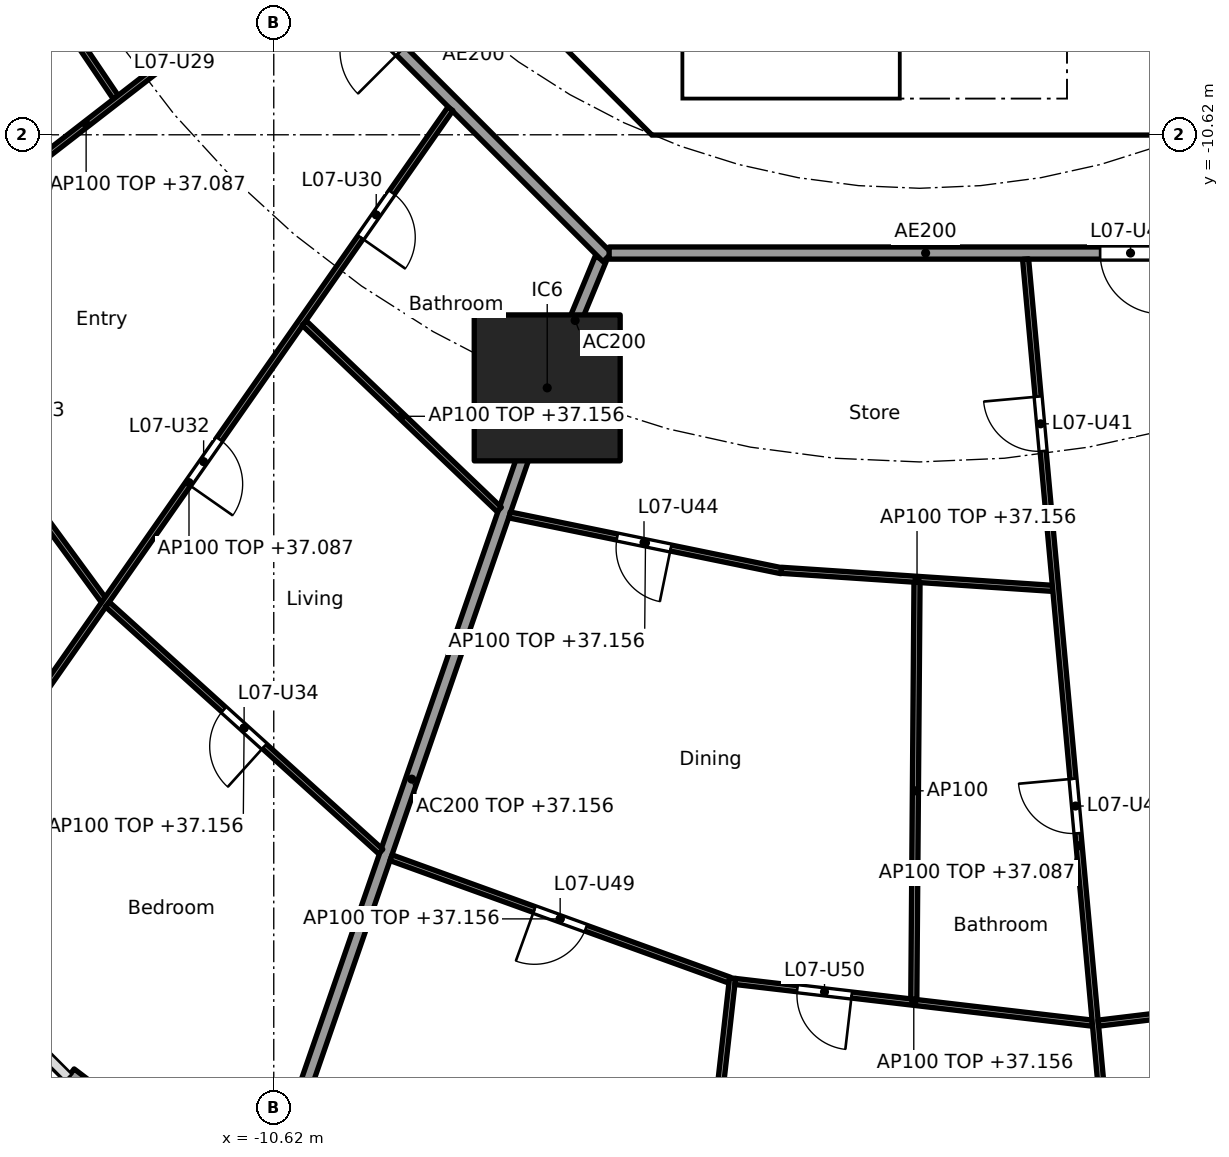
"""IFC4 building model, lengths in metres.
Left out: names, types, materials, properties, quantities, classifications, styles, units other than length and angle.
Written with IfcOpenShell. Run it as: python <this file> out.ifc"""

import sys

from ifc_helpers import new_model, si_unit, direction, frame, frame_2d, origin, origin_2d, place, context, subcontext, project, spatial, polyline, rectangle, outline, extrude, element, fill, save


model = new_model("IFC4")
c1 = context("Model", 3, precision=1e-05, world=origin(), true_north=direction((0.0, 1.0)))
c2 = subcontext(c1, "Body", "Model", "MODEL_VIEW")
j1 = project(units=[si_unit("LENGTHUNIT", "METRE"), si_unit("PLANEANGLEUNIT", "RADIAN")], contexts=[c1])
p1 = place(None, origin())
s1 = spatial("IfcSite", under=j1, at=p1, CompositionType="ELEMENT")
p2 = place(p1, origin())
s2 = spatial("IfcBuilding", under=s1, at=p2, CompositionType="ELEMENT")
p3 = place(p2, frame((0.0, 0.0, 34.4)))
s3 = spatial("IfcBuildingStorey", under=s2, at=p3, CompositionType="ELEMENT", Elevation=34.4)
p4 = place(p3, frame((-6.123, -14.782, 0.0), z_axis=(0.0, 0.0, 1.0), x_axis=(1.0, 0.0, 0.0)))
e1 = element("IfcColumn", 1, at=p4, inside=s3, PredefinedType="COLUMN", context=c2, shape_type="SweptSolid", body=[
    extrude(rectangle(XDim=2.4, YDim=2.4, at=origin_2d()), origin(), (0.0, 0.0, 1.0), 3.7),
])
p5 = place(p3, frame((-11.382, -28.056, 0.0), z_axis=(0.0, 0.0, 1.0), x_axis=(-0.796022293214, 0.605267303517, 0.0)))
e2 = element("IfcWall", 2, at=p5, inside=s3, PredefinedType="SOLIDWALL", context=c2, shape_type="SweptSolid", body=[
    extrude(rectangle(XDim=3.262, YDim=0.25, at=frame_2d((1.631, 0.0))), origin(), (0.0, 0.0, 1.0), 3.44),
])
p6 = place(p5, frame((0.581, 0.0, 0.0)))
e3 = element("IfcOpeningElement", 3, at=p6, cuts=e2, PredefinedType="OPENING", context=c2, shape_type="SweptSolid", body=[
    extrude(rectangle(XDim=2.1, YDim=2.4, at=frame_2d((1.05, 1.2))), frame((0.0, 0.135, 0.0), z_axis=(0.0, -1.0, 0.0), x_axis=(1.0, 0.0, 0.0)), (0.0, 0.0, 1.0), 0.27),
])
p7 = place(p3, frame((-9.988, -4.613, 0.0), z_axis=(0.0, 0.0, 1.0), x_axis=(0.707106781187, -0.707106781187, 0.0)))
e4 = element("IfcWall", 4, at=p7, inside=s3, PredefinedType="SHEAR", context=c2, shape_type="SweptSolid", body=[
    extrude(rectangle(XDim=7.602, YDim=0.6, at=frame_2d((3.801, 0.0))), origin(), (0.0, 0.0, 1.0), 3.44),
])
p8 = place(p7, frame((6.151, 0.0, 0.0)))
e5 = element("IfcOpeningElement", 5, at=p8, cuts=e4, PredefinedType="OPENING", context=c2, shape_type="SweptSolid", body=[
    extrude(rectangle(XDim=1.1, YDim=2.1, at=frame_2d((0.55, 1.05))), frame((0.0, 0.31, 0.0), z_axis=(0.0, -1.0, 0.0), x_axis=(1.0, 0.0, 0.0)), (0.0, 0.0, 1.0), 0.62),
])
p9 = place(p3, origin())
e6 = element("IfcWall", 6, at=p9, inside=s3, PredefinedType="SHEAR", context=c2, shape_type="SweptSolid", body=[
    extrude(outline(polyline([(-4.152, -10.025), (4.152, -10.025), (4.401, -9.776), (4.825, -10.2), (4.401, -10.625), (-4.401, -10.625), (-4.825, -10.2), (-4.401, -9.776), (-4.152, -10.025)])), origin(), (0.0, 0.0, 1.0), 3.44),
])
p10 = place(p3, origin())
e7 = element("IfcWall", 7, at=p10, inside=s3, PredefinedType="SOLIDWALL", context=c2, shape_type="SweptSolid", body=[
    extrude(outline(polyline([(-3.9, -10.025), (-4.1, -10.025), (-4.1, -7.025), (-3.9, -7.025), (-3.9, -10.025)])), origin(), (0.0, 0.0, 1.0), 3.44),
])
p11 = place(p3, frame((-5.243, -12.657, 0.0), z_axis=(0.0, 0.0, 1.0), x_axis=(-0.382668627144, -0.923885664896, 0.0)))
e8 = element("IfcWall", 8, at=p11, inside=s3, PredefinedType="PARTITIONING", context=c2, shape_type="SweptSolid", body=[
    extrude(rectangle(XDim=2.2, YDim=0.2, at=frame_2d((1.1, 0.0))), origin(), (0.0, 0.0, 1.0), 3.44),
])
p12 = place(p3, frame((-6.139, -14.829, 0.0), z_axis=(0.0, 0.0, 1.0), x_axis=(-0.327178799566, -0.944962450637, 0.0)))
e9 = element("IfcWall", 9, at=p12, inside=s3, PredefinedType="PARTITIONING", context=c2, shape_type="SweptSolid", body=[
    extrude(rectangle(XDim=13.517, YDim=0.2, at=frame_2d((6.759, 0.0))), origin(), (0.0, 0.0, 1.0), 2.756),
])
p13 = place(p3, frame((-12.635, -5.134, 0.0), z_axis=(0.0, 0.0, 1.0), x_axis=(0.707106781187, -0.707106781187, 0.0)))
e10 = element("IfcWall", 10, at=p13, inside=s3, PredefinedType="PARTITIONING", context=c2, shape_type="SweptSolid", body=[
    extrude(rectangle(XDim=10.609, YDim=0.2, at=frame_2d((5.305, 0.0))), origin(), (0.0, 0.0, 1.0), 3.44),
])
p14 = place(p13, frame((4.804, 0.0, 0.0)))
e11 = element("IfcOpeningElement", 11, at=p14, cuts=e10, PredefinedType="OPENING", context=c2, shape_type="SweptSolid", body=[
    extrude(rectangle(XDim=1.0, YDim=2.1, at=frame_2d((0.5, 1.05))), frame((0.0, 0.11, 0.0), z_axis=(0.0, -1.0, 0.0), x_axis=(1.0, 0.0, 0.0)), (0.0, 0.0, 1.0), 0.22),
])
p15 = place(p3, frame((-5.104, -12.565, 0.0), z_axis=(0.0, 0.0, 1.0), x_axis=(1.0, 0.0, 0.0)))
e12 = element("IfcWall", 12, at=p15, inside=s3, PredefinedType="PARTITIONING", context=c2, shape_type="SweptSolid", body=[
    extrude(rectangle(XDim=10.409, YDim=0.2, at=frame_2d((5.205, 0.0))), origin(), (0.0, 0.0, 1.0), 3.44),
])
p16 = place(p15, frame((8.074, 0.0, 0.0)))
e13 = element("IfcOpeningElement", 13, at=p16, cuts=e12, PredefinedType="OPENING", context=c2, shape_type="SweptSolid", body=[
    extrude(rectangle(XDim=1.0, YDim=2.1, at=frame_2d((0.5, 1.05))), frame((0.0, 0.11, 0.0), z_axis=(0.0, -1.0, 0.0), x_axis=(1.0, 0.0, 0.0)), (0.0, 0.0, 1.0), 0.22),
])
p17 = place(p3, frame((-15.655, -6.391, 0.0), z_axis=(0.0, 0.0, 1.0), x_axis=(0.559126445155, -0.82908239538, 0.0)))
e14 = element("IfcWall", 14, at=p17, inside=s3, PredefinedType="PARTITIONING", context=c2, shape_type="SweptSolid", body=[
    extrude(rectangle(XDim=4.358, YDim=0.1, at=frame_2d((2.179, 0.0))), origin(), (0.0, 0.0, 1.0), 3.44),
])
p18 = place(p3, frame((-10.19, -7.719, 0.0), z_axis=(0.0, 0.0, 1.0), x_axis=(-0.790264549439, -0.612765813259, 0.0)))
e15 = element("IfcWall", 15, at=p18, inside=s3, PredefinedType="PARTITIONING", context=c2, shape_type="SweptSolid", body=[
    extrude(rectangle(XDim=8.896, YDim=0.1, at=frame_2d((4.448, 0.0))), origin(), (0.0, 0.0, 1.0), 2.687),
])
p19 = place(p18, frame((1.448, 0.0, 0.0)))
e16 = element("IfcOpeningElement", 16, at=p19, cuts=e15, PredefinedType="OPENING", context=c2, shape_type="SweptSolid", body=[
    extrude(rectangle(XDim=0.9, YDim=2.1, at=frame_2d((0.45, 1.05))), frame((0.0, 0.06, 0.0), z_axis=(0.0, -1.0, 0.0), x_axis=(1.0, 0.0, 0.0)), (0.0, 0.0, 1.0), 0.12),
])
p20 = place(p18, frame((5.871, 0.0, 0.0)))
e17 = element("IfcOpeningElement", 17, at=p20, cuts=e15, PredefinedType="OPENING", context=c2, shape_type="SweptSolid", body=[
    extrude(rectangle(XDim=0.9, YDim=2.1, at=frame_2d((0.45, 1.05))), frame((0.0, 0.06, 0.0), z_axis=(0.0, -1.0, 0.0), x_axis=(1.0, 0.0, 0.0)), (0.0, 0.0, 1.0), 0.12),
])
p21 = place(p3, frame((-17.152, -13.18, 0.0), z_axis=(0.0, 0.0, 1.0), x_axis=(0.591222750954, -0.806508312886, 0.0)))
e18 = element("IfcWall", 18, at=p21, inside=s3, PredefinedType="PARTITIONING", context=c2, shape_type="SweptSolid", body=[
    extrude(rectangle(XDim=6.31, YDim=0.1, at=frame_2d((3.155, 0.0))), origin(), (0.0, 0.0, 1.0), 2.756),
])
p22 = place(p21, frame((2.705, 0.0, 0.0)))
e19 = element("IfcOpeningElement", 19, at=p22, cuts=e18, PredefinedType="OPENING", context=c2, shape_type="SweptSolid", body=[
    extrude(rectangle(XDim=0.9, YDim=2.1, at=frame_2d((0.45, 1.05))), frame((0.0, 0.06, 0.0), z_axis=(0.0, -1.0, 0.0), x_axis=(1.0, 0.0, 0.0)), (0.0, 0.0, 1.0), 0.12),
])
p23 = place(p3, frame((-7.715, -10.193, 0.0), z_axis=(0.0, 0.0, 1.0), x_axis=(-0.573126964124, -0.819466584428, 0.0)))
e20 = element("IfcWall", 20, at=p23, inside=s3, PredefinedType="PARTITIONING", context=c2, shape_type="SweptSolid", body=[
    extrude(rectangle(XDim=15.001, YDim=0.1, at=frame_2d((7.5, 0.0))), origin(), (0.0, 0.0, 1.0), 2.687),
])
p24 = place(p23, frame((1.678, 0.0, 0.0)))
e21 = element("IfcOpeningElement", 21, at=p24, cuts=e20, PredefinedType="OPENING", context=c2, shape_type="SweptSolid", body=[
    extrude(rectangle(XDim=0.9, YDim=2.1, at=frame_2d((0.45, 1.05))), frame((0.0, 0.06, 0.0), z_axis=(0.0, -1.0, 0.0), x_axis=(1.0, 0.0, 0.0)), (0.0, 0.0, 1.0), 0.12),
])
p25 = place(p23, frame((6.631, 0.0, 0.0)))
e22 = element("IfcOpeningElement", 22, at=p25, cuts=e20, PredefinedType="OPENING", context=c2, shape_type="SweptSolid", body=[
    extrude(rectangle(XDim=0.9, YDim=2.1, at=frame_2d((0.45, 1.05))), frame((0.0, 0.06, 0.0), z_axis=(0.0, -1.0, 0.0), x_axis=(1.0, 0.0, 0.0)), (0.0, 0.0, 1.0), 0.12),
])
p26 = place(p3, frame((-10.119, -13.716, 0.0), z_axis=(0.0, 0.0, 1.0), x_axis=(0.722775679202, -0.691082713975, 0.0)))
e23 = element("IfcWall", 23, at=p26, inside=s3, PredefinedType="PARTITIONING", context=c2, shape_type="SweptSolid", body=[
    extrude(rectangle(XDim=4.437, YDim=0.1, at=frame_2d((2.219, 0.0))), origin(), (0.0, 0.0, 1.0), 2.756),
])
p27 = place(p3, frame((-13.355, -18.343, 0.0), z_axis=(0.0, 0.0, 1.0), x_axis=(0.741713303551, -0.670717060567, 0.0)))
e24 = element("IfcWall", 24, at=p27, inside=s3, PredefinedType="PARTITIONING", context=c2, shape_type="SweptSolid", body=[
    extrude(rectangle(XDim=6.059, YDim=0.1, at=frame_2d((3.03, 0.0))), origin(), (0.0, 0.0, 1.0), 2.756),
])
p28 = place(p27, frame((2.58, 0.0, 0.0)))
e25 = element("IfcOpeningElement", 25, at=p28, cuts=e24, PredefinedType="OPENING", context=c2, shape_type="SweptSolid", body=[
    extrude(rectangle(XDim=0.9, YDim=2.1, at=frame_2d((0.45, 1.05))), frame((0.0, 0.06, 0.0), z_axis=(0.0, -1.0, 0.0), x_axis=(1.0, 0.0, 0.0)), (0.0, 0.0, 1.0), 0.12),
])
p29 = place(p3, frame((-6.741, -16.872, 0.0), z_axis=(0.0, 0.0, 1.0), x_axis=(0.979595137747, -0.200981009307, 0.0)))
e26 = element("IfcWall", 26, at=p29, inside=s3, PredefinedType="PARTITIONING", context=c2, shape_type="SweptSolid", body=[
    extrude(rectangle(XDim=4.562, YDim=0.1, at=frame_2d((2.281, 0.0))), origin(), (0.0, 0.0, 1.0), 2.756),
])
p30 = place(p29, frame((1.806, 0.0, 0.0)))
e27 = element("IfcOpeningElement", 27, at=p30, cuts=e26, PredefinedType="OPENING", context=c2, shape_type="SweptSolid", body=[
    extrude(rectangle(XDim=0.9, YDim=2.1, at=frame_2d((0.45, 1.05))), frame((0.0, 0.06, 0.0), z_axis=(0.0, -1.0, 0.0), x_axis=(1.0, 0.0, 0.0)), (0.0, 0.0, 1.0), 0.12),
])
p31 = place(p3, frame((-8.692, -22.508, 0.0), z_axis=(0.0, 0.0, 1.0), x_axis=(0.940401494588, -0.340066212636, 0.0)))
e28 = element("IfcWall", 28, at=p31, inside=s3, PredefinedType="PARTITIONING", context=c2, shape_type="SweptSolid", body=[
    extrude(rectangle(XDim=5.917, YDim=0.1, at=frame_2d((2.958, 0.0))), origin(), (0.0, 0.0, 1.0), 2.756),
])
p32 = place(p31, frame((2.509, 0.0, 0.0)))
e29 = element("IfcOpeningElement", 29, at=p32, cuts=e28, PredefinedType="OPENING", context=c2, shape_type="SweptSolid", body=[
    extrude(rectangle(XDim=0.9, YDim=2.1, at=frame_2d((0.45, 1.05))), frame((0.0, 0.06, 0.0), z_axis=(0.0, -1.0, 0.0), x_axis=(1.0, 0.0, 0.0)), (0.0, 0.0, 1.0), 0.12),
])
p33 = place(p3, frame((-2.271, -17.782, 0.0), z_axis=(0.0, 0.0, 1.0), x_axis=(0.997791437766, -0.066424744789, 0.0)))
e30 = element("IfcWall", 30, at=p33, inside=s3, PredefinedType="PARTITIONING", context=c2, shape_type="SweptSolid", body=[
    extrude(rectangle(XDim=4.469, YDim=0.1, at=frame_2d((2.235, 0.0))), origin(), (0.0, 0.0, 1.0), 2.756),
])
p34 = place(p3, frame((-3.075, -24.488, 0.0), z_axis=(0.0, 0.0, 1.0), x_axis=(-0.111705235978, -0.993741384997, 0.0)))
e31 = element("IfcWall", 31, at=p34, inside=s3, PredefinedType="PARTITIONING", context=c2, shape_type="SweptSolid", body=[
    extrude(rectangle(XDim=6.395, YDim=0.1, at=frame_2d((3.198, 0.0))), origin(), (0.0, 0.0, 1.0), 2.756),
])
p35 = place(p3, frame((-3.031, -24.543, 0.0), z_axis=(0.0, 0.0, 1.0), x_axis=(0.993255612046, -0.115945198862, 0.0)))
e32 = element("IfcWall", 32, at=p35, inside=s3, PredefinedType="PARTITIONING", context=c2, shape_type="SweptSolid", body=[
    extrude(rectangle(XDim=5.913, YDim=0.1, at=frame_2d((2.956, 0.0))), origin(), (0.0, 0.0, 1.0), 2.756),
])
p36 = place(p35, frame((1.028, 0.0, 0.0)))
e33 = element("IfcOpeningElement", 33, at=p36, cuts=e32, PredefinedType="OPENING", context=c2, shape_type="SweptSolid", body=[
    extrude(rectangle(XDim=0.9, YDim=2.1, at=frame_2d((0.45, 1.05))), frame((0.0, 0.06, 0.0), z_axis=(0.0, -1.0, 0.0), x_axis=(1.0, 0.0, 0.0)), (0.0, 0.0, 1.0), 0.12),
])
p37 = place(p3, frame((-0.042, -17.98, 0.0), z_axis=(0.0, 0.0, 1.0), x_axis=(-0.007692080119, -0.999970415514, 0.0)))
e34 = element("IfcWall", 34, at=p37, inside=s3, PredefinedType="PARTITIONING", context=c2, shape_type="SweptSolid", body=[
    extrude(rectangle(XDim=6.856, YDim=0.1, at=frame_2d((3.428, 0.0))), origin(), (0.0, 0.0, 1.0), 3.44),
])
p38 = place(p3, frame((1.744, -12.664, 0.0), z_axis=(0.0, 0.0, 1.0), x_axis=(0.090893639596, -0.995860605849, 0.0)))
e35 = element("IfcWall", 35, at=p38, inside=s3, PredefinedType="PARTITIONING", context=c2, shape_type="SweptSolid", body=[
    extrude(rectangle(XDim=19.374, YDim=0.1, at=frame_2d((9.687, 0.0))), origin(), (0.0, 0.0, 1.0), 2.687),
])
p39 = place(p38, frame((2.27, 0.0, 0.0)))
e36 = element("IfcOpeningElement", 36, at=p39, cuts=e35, PredefinedType="OPENING", context=c2, shape_type="SweptSolid", body=[
    extrude(rectangle(XDim=0.9, YDim=2.1, at=frame_2d((0.45, 1.05))), frame((0.0, 0.06, 0.0), z_axis=(0.0, -1.0, 0.0), x_axis=(1.0, 0.0, 0.0)), (0.0, 0.0, 1.0), 0.12),
])
p40 = place(p38, frame((8.582, 0.0, 0.0)))
e37 = element("IfcOpeningElement", 37, at=p40, cuts=e35, PredefinedType="OPENING", context=c2, shape_type="SweptSolid", body=[
    extrude(rectangle(XDim=0.9, YDim=2.1, at=frame_2d((0.45, 1.05))), frame((0.0, 0.06, 0.0), z_axis=(0.0, -1.0, 0.0), x_axis=(1.0, 0.0, 0.0)), (0.0, 0.0, 1.0), 0.12),
])
p41 = place(p38, frame((15.548, 0.0, 0.0)))
e38 = element("IfcOpeningElement", 38, at=p41, cuts=e35, PredefinedType="OPENING", context=c2, shape_type="SweptSolid", body=[
    extrude(rectangle(XDim=0.9, YDim=2.1, at=frame_2d((0.45, 1.05))), frame((0.0, 0.06, 0.0), z_axis=(0.0, -1.0, 0.0), x_axis=(1.0, 0.0, 0.0)), (0.0, 0.0, 1.0), 0.12),
])
p42 = place(p3, frame((2.941, -25.229, 0.0), z_axis=(0.0, 0.0, 1.0), x_axis=(0.992836798252, 0.119478416615, 0.0)))
e39 = element("IfcWall", 39, at=p42, inside=s3, PredefinedType="PARTITIONING", context=c2, shape_type="SweptSolid", body=[
    extrude(rectangle(XDim=6.01, YDim=0.1, at=frame_2d((3.005, 0.0))), origin(), (0.0, 0.0, 1.0), 2.756),
])
p43 = place(p8, origin())
e40 = element("IfcDoor", 40, at=p43, inside=s3, OperationType="SINGLE_SWING_RIGHT", PredefinedType="DOOR", context=c2, shape_type="SweptSolid", body=[
    extrude(rectangle(XDim=1.1, YDim=2.1, at=frame_2d((0.55, 1.05))), frame((0.0, 0.025, 0.0), z_axis=(0.0, -1.0, 0.0), x_axis=(1.0, 0.0, 0.0)), (0.0, 0.0, 1.0), 0.05),
])
fill(e5, e40)
p44 = place(p24, origin())
e41 = element("IfcDoor", 41, at=p44, inside=s3, OperationType="SINGLE_SWING_RIGHT", PredefinedType="DOOR", context=c2, shape_type="SweptSolid", body=[
    extrude(rectangle(XDim=0.9, YDim=2.1, at=frame_2d((0.45, 1.05))), frame((0.0, 0.025, 0.0), z_axis=(0.0, -1.0, 0.0), x_axis=(1.0, 0.0, 0.0)), (0.0, 0.0, 1.0), 0.05),
])
fill(e21, e41)
p45 = place(p25, origin())
e42 = element("IfcDoor", 42, at=p45, inside=s3, OperationType="SINGLE_SWING_RIGHT", PredefinedType="DOOR", context=c2, shape_type="SweptSolid", body=[
    extrude(rectangle(XDim=0.9, YDim=2.1, at=frame_2d((0.45, 1.05))), frame((0.0, 0.025, 0.0), z_axis=(0.0, -1.0, 0.0), x_axis=(1.0, 0.0, 0.0)), (0.0, 0.0, 1.0), 0.05),
])
fill(e22, e42)
p46 = place(p28, frame((0.9, 0.0, 0.0), x_axis=(-1.0, 0.0, 0.0)))
e43 = element("IfcDoor", 43, at=p46, inside=s3, OperationType="SINGLE_SWING_LEFT", PredefinedType="DOOR", context=c2, shape_type="SweptSolid", body=[
    extrude(rectangle(XDim=0.9, YDim=2.1, at=frame_2d((0.45, 1.05))), frame((0.0, 0.025, 0.0), z_axis=(0.0, -1.0, 0.0), x_axis=(1.0, 0.0, 0.0)), (0.0, 0.0, 1.0), 0.05),
])
fill(e25, e43)
p47 = place(p16, frame((1.0, 0.0, 0.0), x_axis=(-1.0, 0.0, 0.0)))
e44 = element("IfcDoor", 44, at=p47, inside=s3, OperationType="SINGLE_SWING_LEFT", PredefinedType="DOOR", context=c2, shape_type="SweptSolid", body=[
    extrude(rectangle(XDim=1.0, YDim=2.1, at=frame_2d((0.5, 1.05))), frame((0.0, 0.025, 0.0), z_axis=(0.0, -1.0, 0.0), x_axis=(1.0, 0.0, 0.0)), (0.0, 0.0, 1.0), 0.05),
])
fill(e13, e44)
p48 = place(p39, frame((0.9, 0.0, 0.0), x_axis=(-1.0, 0.0, 0.0)))
e45 = element("IfcDoor", 45, at=p48, inside=s3, OperationType="SINGLE_SWING_RIGHT", PredefinedType="DOOR", context=c2, shape_type="SweptSolid", body=[
    extrude(rectangle(XDim=0.9, YDim=2.1, at=frame_2d((0.45, 1.05))), frame((0.0, 0.025, 0.0), z_axis=(0.0, -1.0, 0.0), x_axis=(1.0, 0.0, 0.0)), (0.0, 0.0, 1.0), 0.05),
])
fill(e36, e45)
p49 = place(p30, frame((0.9, 0.0, 0.0), x_axis=(-1.0, 0.0, 0.0)))
e46 = element("IfcDoor", 46, at=p49, inside=s3, OperationType="SINGLE_SWING_LEFT", PredefinedType="DOOR", context=c2, shape_type="SweptSolid", body=[
    extrude(rectangle(XDim=0.9, YDim=2.1, at=frame_2d((0.45, 1.05))), frame((0.0, 0.025, 0.0), z_axis=(0.0, -1.0, 0.0), x_axis=(1.0, 0.0, 0.0)), (0.0, 0.0, 1.0), 0.05),
])
fill(e27, e46)
p50 = place(p40, frame((0.9, 0.0, 0.0), x_axis=(-1.0, 0.0, 0.0)))
e47 = element("IfcDoor", 47, at=p50, inside=s3, OperationType="SINGLE_SWING_RIGHT", PredefinedType="DOOR", context=c2, shape_type="SweptSolid", body=[
    extrude(rectangle(XDim=0.9, YDim=2.1, at=frame_2d((0.45, 1.05))), frame((0.0, 0.025, 0.0), z_axis=(0.0, -1.0, 0.0), x_axis=(1.0, 0.0, 0.0)), (0.0, 0.0, 1.0), 0.05),
])
fill(e37, e47)
p51 = place(p32, frame((0.9, 0.0, 0.0), x_axis=(-1.0, 0.0, 0.0)))
e48 = element("IfcDoor", 48, at=p51, inside=s3, OperationType="SINGLE_SWING_RIGHT", PredefinedType="DOOR", context=c2, shape_type="SweptSolid", body=[
    extrude(rectangle(XDim=0.9, YDim=2.1, at=frame_2d((0.45, 1.05))), frame((0.0, 0.025, 0.0), z_axis=(0.0, -1.0, 0.0), x_axis=(1.0, 0.0, 0.0)), (0.0, 0.0, 1.0), 0.05),
])
fill(e29, e48)
p52 = place(p36, frame((0.9, 0.0, 0.0), x_axis=(-1.0, 0.0, 0.0)))
e49 = element("IfcDoor", 49, at=p52, inside=s3, OperationType="SINGLE_SWING_LEFT", PredefinedType="DOOR", context=c2, shape_type="SweptSolid", body=[
    extrude(rectangle(XDim=0.9, YDim=2.1, at=frame_2d((0.45, 1.05))), frame((0.0, 0.025, 0.0), z_axis=(0.0, -1.0, 0.0), x_axis=(1.0, 0.0, 0.0)), (0.0, 0.0, 1.0), 0.05),
])
fill(e33, e49)
save(model, sys.argv[1])
